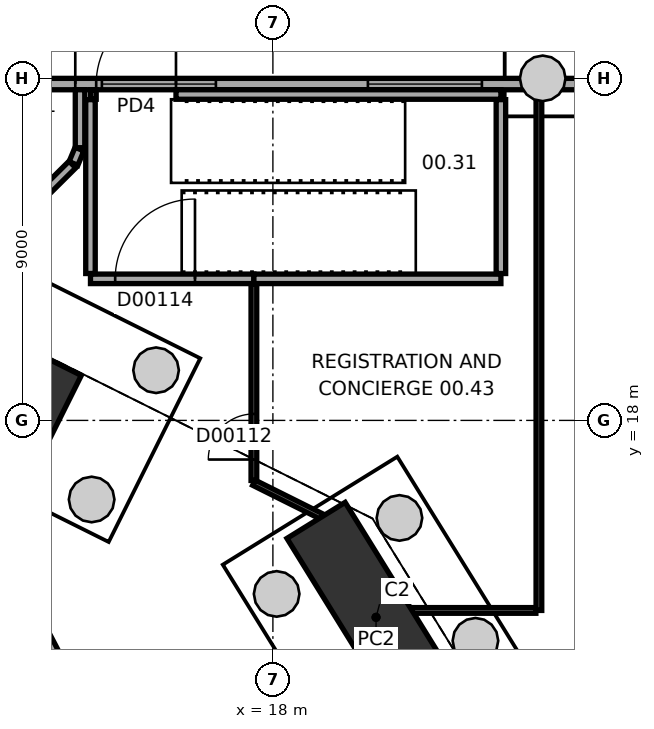
"""IFC4 building model, lengths in metres.
Left out: names, types, materials, properties, quantities, classifications, styles, units other than length and angle.
Written with IfcOpenShell. Run it as: python <this file> out.ifc"""

import sys

from ifc_helpers import new_model, si_unit, direction, frame, frame_2d, origin, origin_2d, place, context, subcontext, project, spatial, rectangle, extrude, element, fill, save


model = new_model("IFC4")
c1 = context("Model", 3, precision=1e-05, world=origin(), true_north=direction((0.0, 1.0)))
c2 = subcontext(c1, "Body", "Model", "MODEL_VIEW")
j1 = project(units=[si_unit("LENGTHUNIT", "METRE"), si_unit("PLANEANGLEUNIT", "RADIAN")], contexts=[c1])
p1 = place(None, origin())
s1 = spatial("IfcSite", under=j1, at=p1, CompositionType="ELEMENT")
p2 = place(p1, origin())
s2 = spatial("IfcBuilding", under=s1, at=p2, CompositionType="ELEMENT")
p3 = place(p2, origin())
s3 = spatial("IfcBuildingStorey", under=s2, at=p3, CompositionType="ELEMENT", Elevation=0.0)
p4 = place(p3, frame((20.714, 12.818, -0.3), z_axis=(0.0, 0.0, 1.0), x_axis=(-0.526210955359, 0.850354061823, 0.0)))
e1 = element("IfcColumn", 1, at=p4, inside=s3, PredefinedType="COLUMN", context=c2, shape_type="SweptSolid", body=[
    extrude(rectangle(XDim=6.0, YDim=1.8, at=origin_2d()), origin(), (0.0, 0.0, 1.0), 7.8),
])
p5 = place(p3, frame((10.677, 19.315, -0.3), z_axis=(0.0, 0.0, 1.0), x_axis=(-0.894935140363, 0.446196251154, 0.0)))
e2 = element("IfcColumn", 2, at=p5, inside=s3, PredefinedType="COLUMN", context=c2, shape_type="SweptSolid", body=[
    extrude(rectangle(XDim=4.2, YDim=1.8, at=origin_2d()), origin(), (0.0, 0.0, 1.0), 7.8),
])
p6 = place(p3, frame((26.45, 26.85, 0.0), z_axis=(0.0, 0.0, 1.0), x_axis=(-1.0, 0.0, 0.0)))
e3 = element("IfcWall", 3, at=p6, inside=s3, PredefinedType="STANDARD", context=c2, shape_type="SweptSolid", body=[
    extrude(rectangle(XDim=16.9, YDim=0.3, at=frame_2d((8.45, 0.0))), origin(), (0.0, 0.0, 1.0), 6.0),
])
p7 = place(p6, frame((2.95, 0.0, 4.7)))
e4 = element("IfcOpeningElement", 4, at=p7, cuts=e3, PredefinedType="OPENING", context=c2, shape_type="SweptSolid", body=[
    extrude(rectangle(XDim=3.0, YDim=1.3, at=frame_2d((1.5, 0.65))), frame((0.0, 0.16, 0.0), z_axis=(0.0, -1.0, 0.0), x_axis=(1.0, 0.0, 0.0)), (0.0, 0.0, 1.0), 0.32),
])
p8 = place(p6, frame((9.95, 0.0, 4.7)))
e5 = element("IfcOpeningElement", 5, at=p8, cuts=e3, PredefinedType="OPENING", context=c2, shape_type="SweptSolid", body=[
    extrude(rectangle(XDim=3.0, YDim=1.3, at=frame_2d((1.5, 0.65))), frame((0.0, 0.16, 0.0), z_axis=(0.0, -1.0, 0.0), x_axis=(1.0, 0.0, 0.0)), (0.0, 0.0, 1.0), 0.32),
])
p9 = place(p6, frame((11.0, 0.0, 0.0)))
e6 = element("IfcOpeningElement", 6, at=p9, cuts=e3, PredefinedType="OPENING", context=c2, shape_type="SweptSolid", body=[
    extrude(rectangle(XDim=2.1, YDim=2.4, at=frame_2d((1.05, 1.2))), frame((0.0, 0.16, 0.0), z_axis=(0.0, -1.0, 0.0), x_axis=(1.0, 0.0, 0.0)), (0.0, 0.0, 1.0), 0.32),
])
p10 = place(p6, frame((13.65, 0.0, 0.0)))
e7 = element("IfcOpeningElement", 7, at=p10, cuts=e3, PredefinedType="OPENING", context=c2, shape_type="SweptSolid", body=[
    extrude(rectangle(XDim=2.0, YDim=2.4, at=frame_2d((1.0, 1.2))), frame((0.0, 0.16, 0.0), z_axis=(0.0, -1.0, 0.0), x_axis=(1.0, 0.0, 0.0)), (0.0, 0.0, 1.0), 0.32),
])
p11 = place(p3, frame((24.92, 13.0, 0.0), z_axis=(0.0, 0.0, 1.0), x_axis=(-1.0, 0.0, 0.0)))
e8 = element("IfcWall", 8, at=p11, inside=s3, PredefinedType="PARTITIONING", context=c2, shape_type="SweptSolid", body=[
    extrude(rectangle(XDim=3.26, YDim=0.15, at=frame_2d((1.63, 0.0))), origin(), (0.0, 0.0, 1.0), 7.2),
])
p12 = place(p3, frame((19.293, 15.467, 0.0), z_axis=(0.0, 0.0, 1.0), x_axis=(-0.894938486027, 0.446189540698, 0.0)))
e9 = element("IfcWall", 9, at=p12, inside=s3, PredefinedType="PARTITIONING", context=c2, shape_type="SweptSolid", body=[
    extrude(rectangle(XDim=2.003, YDim=0.15, at=frame_2d((1.001, 0.0))), origin(), (0.0, 0.0, 1.0), 5.7),
])
p13 = place(p3, frame((17.5, 16.42, 0.0), z_axis=(0.0, 0.0, 1.0), x_axis=(0.0, 1.0, 0.0)))
e10 = element("IfcWall", 10, at=p13, inside=s3, PredefinedType="PARTITIONING", context=c2, shape_type="SweptSolid", body=[
    extrude(rectangle(XDim=5.165, YDim=0.15, at=frame_2d((2.582, 0.0))), origin(), (0.0, 0.0, 1.0), 7.2),
])
p14 = place(p13, frame((0.55, 0.0, 0.0)))
e11 = element("IfcOpeningElement", 11, at=p14, cuts=e10, PredefinedType="OPENING", context=c2, shape_type="SweptSolid", body=[
    extrude(rectangle(XDim=1.2, YDim=2.1, at=frame_2d((0.6, 1.05))), frame((0.0, 0.085, 0.0), z_axis=(0.0, -1.0, 0.0), x_axis=(1.0, 0.0, 0.0)), (0.0, 0.0, 1.0), 0.17),
])
p15 = place(p3, frame((8.501, 19.05, 0.0), z_axis=(0.0, 0.0, 1.0), x_axis=(0.463035832023, -0.88633956149, 0.0)))
e12 = element("IfcWall", 12, at=p15, inside=s3, PredefinedType="SOLIDWALL", context=c2, shape_type="SweptSolid", body=[
    extrude(rectangle(XDim=9.34, YDim=0.25, at=frame_2d((4.67, 0.0))), origin(), (0.0, 0.0, 1.0), 7.2),
])
p16 = place(p3, frame((17.5, 21.725, 0.0), z_axis=(0.0, 0.0, 1.0), x_axis=(-1.0, 0.0, 0.0)))
e13 = element("IfcWall", 13, at=p16, inside=s3, PredefinedType="SOLIDWALL", context=c2, shape_type="SweptSolid", body=[
    extrude(rectangle(XDim=4.3, YDim=0.25, at=frame_2d((2.15, 0.0))), origin(), (0.0, 0.0, 1.0), 7.2),
])
p17 = place(p16, frame((1.55, 0.0, 0.0)))
e14 = element("IfcOpeningElement", 14, at=p17, cuts=e13, PredefinedType="OPENING", context=c2, shape_type="SweptSolid", body=[
    extrude(rectangle(XDim=2.1, YDim=2.4, at=frame_2d((1.05, 1.2))), frame((0.0, 0.135, 0.0), z_axis=(0.0, -1.0, 0.0), x_axis=(1.0, 0.0, 0.0)), (0.0, 0.0, 1.0), 0.27),
])
p18 = place(p3, frame((24.0, 21.725, 0.0), z_axis=(0.0, 0.0, 1.0), x_axis=(-1.0, 0.0, 0.0)))
e15 = element("IfcWall", 15, at=p18, inside=s3, PredefinedType="SOLIDWALL", context=c2, shape_type="SweptSolid", body=[
    extrude(rectangle(XDim=6.5, YDim=0.25, at=frame_2d((3.25, 0.0))), origin(), (0.0, 0.0, 1.0), 7.2),
])
p19 = place(p3, frame((13.2, 21.865, 0.0), z_axis=(0.0, 0.0, 1.0), x_axis=(0.0, 1.0, 0.0)))
e16 = element("IfcWall", 16, at=p19, inside=s3, PredefinedType="SOLIDWALL", context=c2, shape_type="SweptSolid", body=[
    extrude(rectangle(XDim=4.575, YDim=0.25, at=frame_2d((2.288, 0.0))), origin(), (0.0, 0.0, 1.0), 7.2),
])
p20 = place(p3, frame((12.724, 24.732, 0.0), z_axis=(0.0, 0.0, 1.0), x_axis=(-0.709356161032, -0.70485022296, 0.0)))
e17 = element("IfcWall", 17, at=p20, inside=s3, PredefinedType="SOLIDWALL", context=c2, shape_type="SweptSolid", body=[
    extrude(rectangle(XDim=4.822, YDim=0.25, at=frame_2d((2.411, 0.0))), origin(), (0.0, 0.0, 1.0), 7.2),
])
p21 = place(p3, frame((12.91, 25.139, 0.0), z_axis=(0.0, 0.0, 1.0), x_axis=(-0.383895701408, -0.923376461927, 0.0)))
e18 = element("IfcWall", 18, at=p21, inside=s3, PredefinedType="SOLIDWALL", context=c2, shape_type="SweptSolid", body=[
    extrude(rectangle(XDim=0.41, YDim=0.25, at=frame_2d((0.205, 0.0))), origin(), (0.0, 0.0, 1.0), 7.2),
])
p22 = place(p3, frame((24.0, 26.44, 0.0), z_axis=(0.0, 0.0, 1.0), x_axis=(0.0, -1.0, 0.0)))
e19 = element("IfcWall", 19, at=p22, inside=s3, PredefinedType="SOLIDWALL", context=c2, shape_type="SweptSolid", body=[
    extrude(rectangle(XDim=4.575, YDim=0.25, at=frame_2d((2.288, 0.0))), origin(), (0.0, 0.0, 1.0), 7.2),
])
p23 = place(p3, frame((12.925, 26.7, 0.0), z_axis=(0.0, 0.0, 1.0), x_axis=(0.0, -1.0, 0.0)))
e20 = element("IfcWall", 20, at=p23, inside=s3, PredefinedType="SOLIDWALL", context=c2, shape_type="SweptSolid", body=[
    extrude(rectangle(XDim=1.524, YDim=0.25, at=frame_2d((0.762, 0.0))), origin(), (0.0, 0.0, 1.0), 7.2),
])
p24 = place(p3, frame((25.0, 26.7, 0.0), z_axis=(0.0, 0.0, 1.0), x_axis=(0.0, -1.0, 0.0)))
e21 = element("IfcWall", 21, at=p24, inside=s3, PredefinedType="PARTITIONING", context=c2, shape_type="SweptSolid", body=[
    extrude(rectangle(XDim=13.7, YDim=0.15, at=frame_2d((6.85, 0.0))), origin(), (0.0, 0.0, 1.0), 7.2),
])
p25 = place(p3, frame((24.0, 26.575, 0.0), z_axis=(0.0, 0.0, 1.0), x_axis=(-1.0, 0.0, 0.0)))
e22 = element("IfcWall", 22, at=p25, inside=s3, PredefinedType="SOLIDWALL", context=c2, shape_type="SweptSolid", body=[
    extrude(rectangle(XDim=8.55, YDim=0.25, at=frame_2d((4.275, 0.0))), origin(), (0.0, 0.0, 1.0), 7.2),
])
p26 = place(p3, frame((13.35, 26.575, 0.0), z_axis=(0.0, 0.0, 1.0), x_axis=(-1.0, 0.0, 0.0)))
e23 = element("IfcWall", 23, at=p26, inside=s3, PredefinedType="SOLIDWALL", context=c2, shape_type="SweptSolid", body=[
    extrude(rectangle(XDim=0.15, YDim=0.25, at=frame_2d((0.075, 0.0))), origin(), (0.0, 0.0, 1.0), 7.2),
])
p27 = place(p7, origin())
e24 = element("IfcWindow", 24, at=p27, inside=s3, PartitioningType="SINGLE_PANEL", PredefinedType="WINDOW", context=c2, shape_type="SweptSolid", body=[
    extrude(rectangle(XDim=3.0, YDim=1.3, at=frame_2d((1.5, 0.65))), frame((0.0, 0.03, 0.0), z_axis=(0.0, -1.0, 0.0), x_axis=(1.0, 0.0, 0.0)), (0.0, 0.0, 1.0), 0.06),
])
fill(e4, e24)
p28 = place(p8, origin())
e25 = element("IfcWindow", 25, at=p28, inside=s3, PartitioningType="SINGLE_PANEL", PredefinedType="WINDOW", context=c2, shape_type="SweptSolid", body=[
    extrude(rectangle(XDim=3.0, YDim=1.3, at=frame_2d((1.5, 0.65))), frame((0.0, 0.03, 0.0), z_axis=(0.0, -1.0, 0.0), x_axis=(1.0, 0.0, 0.0)), (0.0, 0.0, 1.0), 0.06),
])
fill(e5, e25)
p29 = place(p14, origin())
e26 = element("IfcDoor", 26, at=p29, inside=s3, OperationType="SINGLE_SWING_LEFT", PredefinedType="DOOR", context=c2, shape_type="SweptSolid", body=[
    extrude(rectangle(XDim=1.2, YDim=2.1, at=frame_2d((0.6, 1.05))), frame((0.0, 0.025, 0.0), z_axis=(0.0, -1.0, 0.0), x_axis=(1.0, 0.0, 0.0)), (0.0, 0.0, 1.0), 0.05),
])
fill(e11, e26)
p30 = place(p17, frame((2.1, 0.0, 0.0), z_axis=(0.0, 0.0, 1.0), x_axis=(-1.0, 0.0, 0.0)))
e27 = element("IfcDoor", 27, at=p30, inside=s3, OperationType="DOUBLE_DOOR_SINGLE_SWING", PredefinedType="DOOR", context=c2, shape_type="SweptSolid", body=[
    extrude(rectangle(XDim=2.1, YDim=2.4, at=frame_2d((1.05, 1.2))), frame((0.0, 0.025, 0.0), z_axis=(0.0, -1.0, 0.0), x_axis=(1.0, 0.0, 0.0)), (0.0, 0.0, 1.0), 0.05),
])
fill(e14, e27)
p31 = place(p9, frame((2.1, 0.0, 0.0), z_axis=(0.0, 0.0, 1.0), x_axis=(-1.0, 0.0, 0.0)))
e28 = element("IfcDoor", 28, at=p31, inside=s3, OperationType="DOUBLE_DOOR_SINGLE_SWING", PredefinedType="DOOR", context=c2, shape_type="SweptSolid", body=[
    extrude(rectangle(XDim=2.1, YDim=2.4, at=frame_2d((1.05, 1.2))), frame((0.0, 0.025, 0.0), z_axis=(0.0, -1.0, 0.0), x_axis=(1.0, 0.0, 0.0)), (0.0, 0.0, 1.0), 0.05),
])
fill(e6, e28)
p32 = place(p10, frame((2.0, 0.0, 0.0), z_axis=(0.0, 0.0, 1.0), x_axis=(-1.0, 0.0, 0.0)))
e29 = element("IfcDoor", 29, at=p32, inside=s3, OperationType="DOUBLE_DOOR_SINGLE_SWING", PredefinedType="DOOR", context=c2, shape_type="SweptSolid", body=[
    extrude(rectangle(XDim=2.0, YDim=2.4, at=frame_2d((1.0, 1.2))), frame((0.0, 0.025, 0.0), z_axis=(0.0, -1.0, 0.0), x_axis=(1.0, 0.0, 0.0)), (0.0, 0.0, 1.0), 0.05),
])
fill(e7, e29)
save(model, sys.argv[1])
